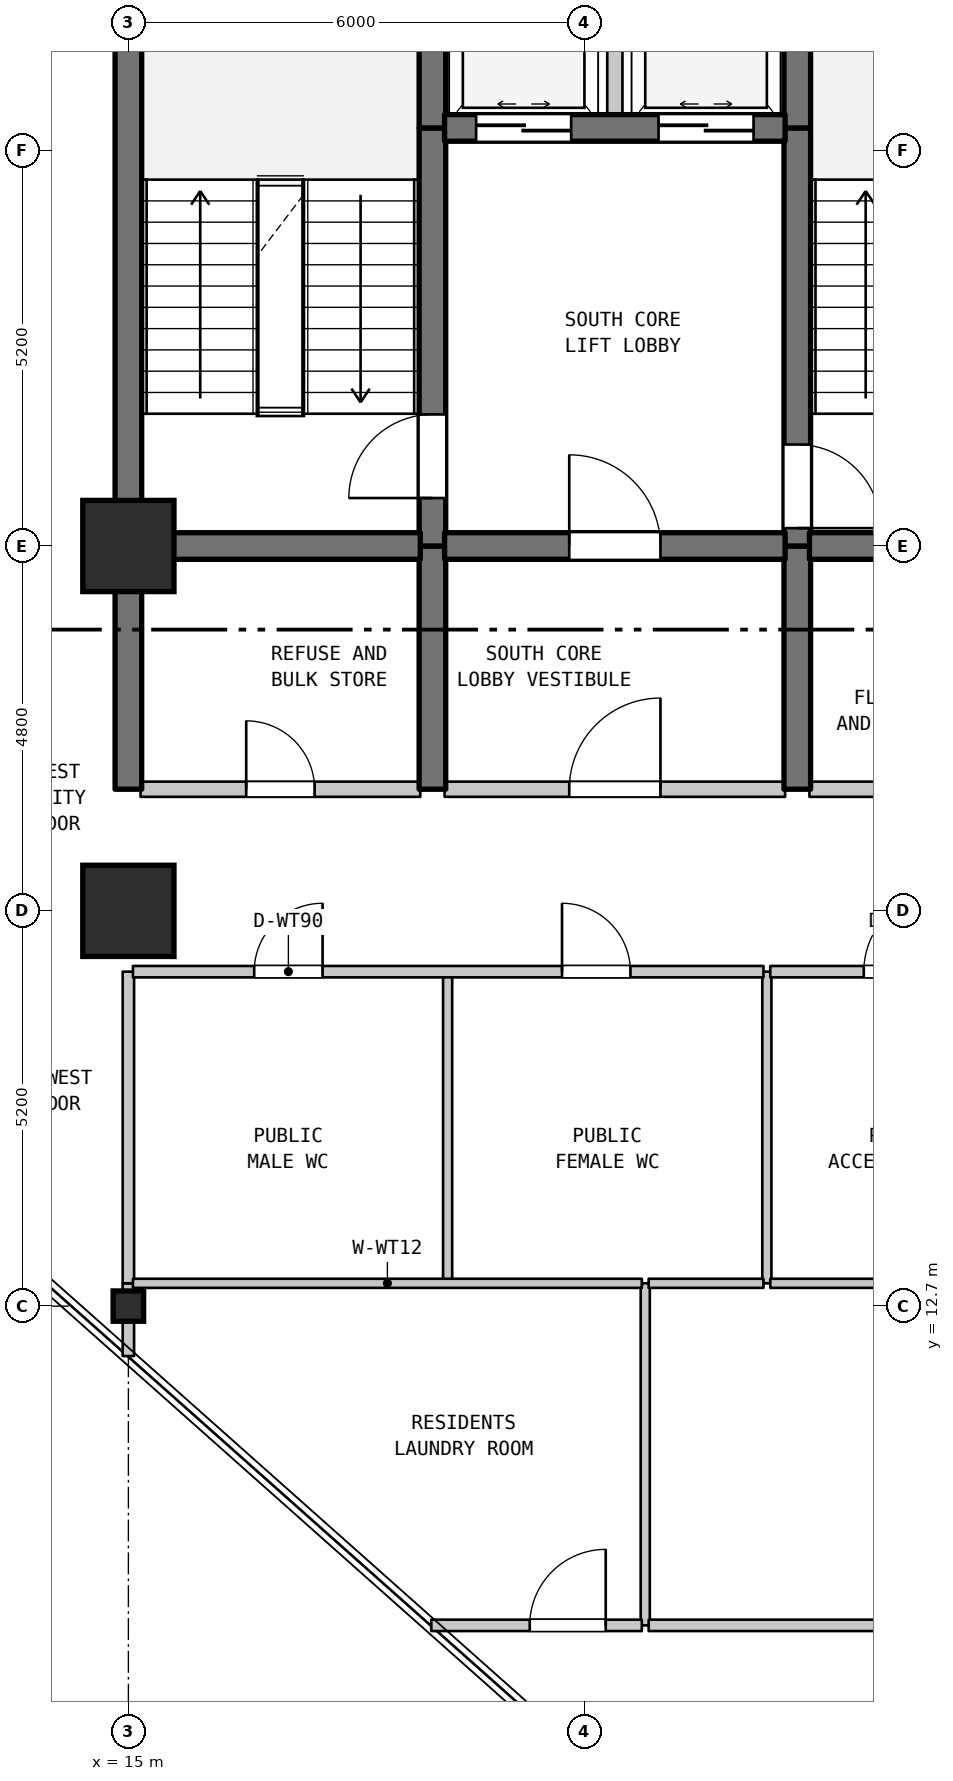
"""IFC4 building model, lengths in metres.
Left out: names, types, materials, properties, quantities, classifications, styles, units other than length and angle.
Written with IfcOpenShell. Run it as: python <this file> out.ifc"""

import sys

from ifc_helpers import new_model, si_unit, direction, frame, frame_2d, origin, origin_2d, place, context, subcontext, project, spatial, rectangle, i_section, extrude, element, fill, save


model = new_model("IFC4")
c1 = context("Model", 3, precision=1e-05, world=origin(), true_north=direction((0.0, 1.0)))
c2 = subcontext(c1, "Body", "Model", "MODEL_VIEW")
j1 = project(units=[si_unit("LENGTHUNIT", "METRE"), si_unit("PLANEANGLEUNIT", "RADIAN")], contexts=[c1])
p1 = place(None, origin())
s1 = spatial("IfcSite", under=j1, at=p1, CompositionType="ELEMENT")
p2 = place(p1, origin())
s2 = spatial("IfcBuilding", under=s1, at=p2, CompositionType="ELEMENT")
p3 = place(p2, frame((0.0, 0.0, 65.6)))
s3 = spatial("IfcBuildingStorey", under=s2, at=p3, CompositionType="ELEMENT", Elevation=65.6)
p4 = place(p3, frame((15.0, 12.7, 0.0), z_axis=(0.0, 0.0, 1.0), x_axis=(1.0, 0.0, 0.0)))
e1 = element("IfcColumn", 1, at=p4, inside=s3, PredefinedType="COLUMN", context=c2, shape_type="SweptSolid", body=[
    extrude(i_section(OverallWidth=0.401, OverallDepth=0.399, WebThickness=0.025, FlangeThickness=0.04, FilletRadius=0.015, at=origin_2d()), origin(), (0.0, 0.0, 1.0), 4.5),
])
for number, where, z_axis, x_axis in (
    (2, (15.0, 17.9, 0.0), (0.0, 0.0, 1.0), (1.0, 0.0, 0.0)),
    (3, (15.0, 22.7, 0.0), (0.0, 0.0, 1.0), (1.0, 0.0, 0.0)),
):
    element("IfcColumn", number, at=place(p3, frame(where, z_axis=z_axis, x_axis=x_axis)), inside=s3, PredefinedType="COLUMN", context=c2, shape_type="SweptSolid", body=[
        extrude(rectangle(XDim=1.2, YDim=1.2, at=origin_2d()), origin(), (0.0, 0.0, 1.0), 4.5),
    ])
p5 = place(p3, frame((15.0, 12.043, 0.0), z_axis=(0.0, 0.0, 1.0), x_axis=(0.0, 1.0, 0.0)))
e4 = element("IfcWall", 4, at=p5, inside=s3, PredefinedType="STANDARD", context=c2, shape_type="SweptSolid", body=[
    extrude(rectangle(XDim=0.957, YDim=0.15, at=frame_2d((0.479, 0.0))), origin(), (0.0, 0.0, 1.0), 4.185),
])
p6 = place(p3, frame((15.0, 13.0, 0.0), z_axis=(0.0, 0.0, 1.0), x_axis=(0.0, 1.0, 0.0)))
e5 = element("IfcWall", 5, at=p6, inside=s3, PredefinedType="STANDARD", context=c2, shape_type="SweptSolid", body=[
    extrude(rectangle(XDim=4.1, YDim=0.15, at=frame_2d((2.05, 0.0))), origin(), (0.0, 0.0, 1.0), 3.685),
])
p7 = place(p3, frame((15.0, 19.5, 0.0), z_axis=(0.0, 0.0, 1.0), x_axis=(0.0, 1.0, 0.0)))
e6 = element("IfcWall", 6, at=p7, inside=s3, PredefinedType="SHEAR", context=c2, shape_type="SweptSolid", body=[
    extrude(rectangle(XDim=3.2, YDim=0.35, at=frame_2d((1.6, 0.0))), origin(), (0.0, 0.0, 1.0), 4.185),
])
p8 = place(p3, frame((15.0, 22.7, 0.0), z_axis=(0.0, 0.0, 1.0), x_axis=(0.0, 1.0, 0.0)))
e7 = element("IfcWall", 7, at=p8, inside=s3, PredefinedType="SHEAR", context=c2, shape_type="SweptSolid", body=[
    extrude(rectangle(XDim=6.8, YDim=0.35, at=frame_2d((3.4, 0.0))), origin(), (0.0, 0.0, 1.0), 4.185),
])
p9 = place(p3, frame((19.0, 19.5, 0.0), z_axis=(0.0, 0.0, 1.0), x_axis=(0.0, 1.0, 0.0)))
e8 = element("IfcWall", 8, at=p9, inside=s3, PredefinedType="SHEAR", context=c2, shape_type="SweptSolid", body=[
    extrude(rectangle(XDim=3.2, YDim=0.35, at=frame_2d((1.6, 0.0))), origin(), (0.0, 0.0, 1.0), 4.185),
])
p10 = place(p3, frame((19.0, 22.7, 0.0), z_axis=(0.0, 0.0, 1.0), x_axis=(0.0, 1.0, 0.0)))
e9 = element("IfcWall", 9, at=p10, inside=s3, PredefinedType="SHEAR", context=c2, shape_type="SweptSolid", body=[
    extrude(rectangle(XDim=5.5, YDim=0.35, at=frame_2d((2.75, 0.0))), origin(), (0.0, 0.0, 1.0), 4.185),
])
p11 = place(p10, frame((0.631, 0.0, 0.0)))
e10 = element("IfcOpeningElement", 10, at=p11, cuts=e9, PredefinedType="OPENING", context=c2, shape_type="SweptSolid", body=[
    extrude(rectangle(XDim=1.1, YDim=2.15, at=frame_2d((0.55, 1.075))), frame((0.0, 0.185, 0.0), z_axis=(0.0, -1.0, 0.0), x_axis=(1.0, 0.0, 0.0)), (0.0, 0.0, 1.0), 0.37),
])
p12 = place(p3, frame((19.0, 28.2, 0.0), z_axis=(0.0, 0.0, 1.0), x_axis=(0.0, 1.0, 0.0)))
e11 = element("IfcWall", 11, at=p12, inside=s3, PredefinedType="SHEAR", context=c2, shape_type="SweptSolid", body=[
    extrude(rectangle(XDim=1.3, YDim=0.35, at=frame_2d((0.65, 0.0))), origin(), (0.0, 0.0, 1.0), 4.185),
])
p13 = place(p3, frame((19.2, 13.0, 0.0), z_axis=(0.0, 0.0, 1.0), x_axis=(0.0, 1.0, 0.0)))
e12 = element("IfcWall", 12, at=p13, inside=s3, PredefinedType="PARTITIONING", context=c2, shape_type="SweptSolid", body=[
    extrude(rectangle(XDim=4.1, YDim=0.12, at=frame_2d((2.05, 0.0))), origin(), (0.0, 0.0, 1.0), 4.185),
])
p14 = place(p3, frame((21.4, 28.2, 0.0), z_axis=(0.0, 0.0, 1.0), x_axis=(0.0, 1.0, 0.0)))
e13 = element("IfcWall", 13, at=p14, inside=s3, PredefinedType="STANDARD", context=c2, shape_type="SweptSolid", body=[
    extrude(rectangle(XDim=2.6, YDim=0.2, at=frame_2d((1.3, 0.0))), origin(), (0.0, 0.0, 1.0), 4.185),
])
p15 = place(p3, frame((21.8, 8.5, 0.0), z_axis=(0.0, 0.0, 1.0), x_axis=(0.0, 1.0, 0.0)))
e14 = element("IfcWall", 14, at=p15, inside=s3, PredefinedType="PARTITIONING", context=c2, shape_type="SweptSolid", body=[
    extrude(rectangle(XDim=4.5, YDim=0.12, at=frame_2d((2.25, 0.0))), origin(), (0.0, 0.0, 1.0), 4.185),
])
p16 = place(p3, frame((23.4, 13.0, 0.0), z_axis=(0.0, 0.0, 1.0), x_axis=(0.0, 1.0, 0.0)))
e15 = element("IfcWall", 15, at=p16, inside=s3, PredefinedType="PARTITIONING", context=c2, shape_type="SweptSolid", body=[
    extrude(rectangle(XDim=4.1, YDim=0.12, at=frame_2d((2.05, 0.0))), origin(), (0.0, 0.0, 1.0), 4.185),
])
p17 = place(p3, frame((23.8, 19.5, 0.0), z_axis=(0.0, 0.0, 1.0), x_axis=(0.0, 1.0, 0.0)))
e16 = element("IfcWall", 16, at=p17, inside=s3, PredefinedType="SHEAR", context=c2, shape_type="SweptSolid", body=[
    extrude(rectangle(XDim=3.2, YDim=0.35, at=frame_2d((1.6, 0.0))), origin(), (0.0, 0.0, 1.0), 4.185),
])
p18 = place(p3, frame((23.8, 22.7, 0.0), z_axis=(0.0, 0.0, 1.0), x_axis=(0.0, 1.0, 0.0)))
e17 = element("IfcWall", 17, at=p18, inside=s3, PredefinedType="SHEAR", context=c2, shape_type="SweptSolid", body=[
    extrude(rectangle(XDim=5.5, YDim=0.35, at=frame_2d((2.75, 0.0))), origin(), (0.0, 0.0, 1.0), 4.185),
])
p19 = place(p18, frame((0.235, 0.0, 0.0)))
e18 = element("IfcOpeningElement", 18, at=p19, cuts=e17, PredefinedType="OPENING", context=c2, shape_type="SweptSolid", body=[
    extrude(rectangle(XDim=1.1, YDim=2.15, at=frame_2d((0.55, 1.075))), frame((0.0, 0.185, 0.0), z_axis=(0.0, -1.0, 0.0), x_axis=(1.0, 0.0, 0.0)), (0.0, 0.0, 1.0), 0.37),
])
p20 = place(p3, frame((23.8, 28.2, 0.0), z_axis=(0.0, 0.0, 1.0), x_axis=(0.0, 1.0, 0.0)))
e19 = element("IfcWall", 19, at=p20, inside=s3, PredefinedType="SHEAR", context=c2, shape_type="SweptSolid", body=[
    extrude(rectangle(XDim=1.3, YDim=0.35, at=frame_2d((0.65, 0.0))), origin(), (0.0, 0.0, 1.0), 4.185),
])
p21 = place(p3, frame((18.985, 8.5, 0.0), z_axis=(0.0, 0.0, 1.0), x_axis=(1.0, 0.0, 0.0)))
e20 = element("IfcWall", 20, at=p21, inside=s3, PredefinedType="STANDARD", context=c2, shape_type="SweptSolid", body=[
    extrude(rectangle(XDim=2.77, YDim=0.15, at=frame_2d((1.385, 0.0))), origin(), (0.0, 0.0, 1.0), 4.185),
])
p22 = place(p21, frame((1.295, 0.0, 0.0)))
e21 = element("IfcOpeningElement", 21, at=p22, cuts=e20, PredefinedType="OPENING", context=c2, shape_type="SweptSolid", body=[
    extrude(rectangle(XDim=1.0, YDim=2.15, at=frame_2d((0.5, 1.075))), frame((0.0, 0.085, 0.0), z_axis=(0.0, -1.0, 0.0), x_axis=(1.0, 0.0, 0.0)), (0.0, 0.0, 1.0), 0.17),
])
p23 = place(p3, frame((21.845, 8.5, 0.0), z_axis=(0.0, 0.0, 1.0), x_axis=(1.0, 0.0, 0.0)))
e22 = element("IfcWall", 22, at=p23, inside=s3, PredefinedType="STANDARD", context=c2, shape_type="SweptSolid", body=[
    extrude(rectangle(XDim=3.31, YDim=0.15, at=frame_2d((1.655, 0.0))), origin(), (0.0, 0.0, 1.0), 4.185),
])
p24 = place(p3, frame((15.06, 13.0, 0.0), z_axis=(0.0, 0.0, 1.0), x_axis=(1.0, 0.0, 0.0)))
e23 = element("IfcWall", 23, at=p24, inside=s3, PredefinedType="PARTITIONING", context=c2, shape_type="SweptSolid", body=[
    extrude(rectangle(XDim=6.695, YDim=0.12, at=frame_2d((3.347, 0.0))), origin(), (0.0, 0.0, 1.0), 4.185),
])
p25 = place(p3, frame((21.845, 13.0, 0.0), z_axis=(0.0, 0.0, 1.0), x_axis=(1.0, 0.0, 0.0)))
e24 = element("IfcWall", 24, at=p25, inside=s3, PredefinedType="PARTITIONING", context=c2, shape_type="SweptSolid", body=[
    extrude(rectangle(XDim=1.51, YDim=0.12, at=frame_2d((0.755, 0.0))), origin(), (0.0, 0.0, 1.0), 4.185),
])
p26 = place(p3, frame((23.445, 13.0, 0.0), z_axis=(0.0, 0.0, 1.0), x_axis=(1.0, 0.0, 0.0)))
e25 = element("IfcWall", 25, at=p26, inside=s3, PredefinedType="PARTITIONING", context=c2, shape_type="SweptSolid", body=[
    extrude(rectangle(XDim=1.71, YDim=0.12, at=frame_2d((0.855, 0.0))), origin(), (0.0, 0.0, 1.0), 4.185),
])
p27 = place(p3, frame((15.06, 17.1, 0.0), z_axis=(0.0, 0.0, 1.0), x_axis=(1.0, 0.0, 0.0)))
e26 = element("IfcWall", 26, at=p27, inside=s3, PredefinedType="STANDARD", context=c2, shape_type="SweptSolid", body=[
    extrude(rectangle(XDim=8.295, YDim=0.15, at=frame_2d((4.147, 0.0))), origin(), (0.0, 0.0, 1.0), 4.185),
])
p28 = place(p27, frame((1.595, 0.0, 0.0)))
e27 = element("IfcOpeningElement", 27, at=p28, cuts=e26, PredefinedType="OPENING", context=c2, shape_type="SweptSolid", body=[
    extrude(rectangle(XDim=0.9, YDim=2.1, at=frame_2d((0.45, 1.05))), frame((0.0, 0.085, 0.0), z_axis=(0.0, -1.0, 0.0), x_axis=(1.0, 0.0, 0.0)), (0.0, 0.0, 1.0), 0.17),
])
p29 = place(p27, frame((5.645, 0.0, 0.0)))
e28 = element("IfcOpeningElement", 28, at=p29, cuts=e26, PredefinedType="OPENING", context=c2, shape_type="SweptSolid", body=[
    extrude(rectangle(XDim=0.9, YDim=2.1, at=frame_2d((0.45, 1.05))), frame((0.0, 0.085, 0.0), z_axis=(0.0, -1.0, 0.0), x_axis=(1.0, 0.0, 0.0)), (0.0, 0.0, 1.0), 0.17),
])
p30 = place(p3, frame((23.445, 17.1, 0.0), z_axis=(0.0, 0.0, 1.0), x_axis=(1.0, 0.0, 0.0)))
e29 = element("IfcWall", 29, at=p30, inside=s3, PredefinedType="STANDARD", context=c2, shape_type="SweptSolid", body=[
    extrude(rectangle(XDim=3.51, YDim=0.15, at=frame_2d((1.755, 0.0))), origin(), (0.0, 0.0, 1.0), 4.185),
])
p31 = place(p30, frame((1.23, 0.0, 0.0)))
e30 = element("IfcOpeningElement", 30, at=p31, cuts=e29, PredefinedType="OPENING", context=c2, shape_type="SweptSolid", body=[
    extrude(rectangle(XDim=1.05, YDim=2.15, at=frame_2d((0.525, 1.075))), frame((0.0, 0.085, 0.0), z_axis=(0.0, -1.0, 0.0), x_axis=(1.0, 0.0, 0.0)), (0.0, 0.0, 1.0), 0.17),
])
p32 = place(p3, frame((15.16, 19.5, 0.0), z_axis=(0.0, 0.0, 1.0), x_axis=(1.0, 0.0, 0.0)))
e31 = element("IfcWall", 31, at=p32, inside=s3, PredefinedType="STANDARD", context=c2, shape_type="SweptSolid", body=[
    extrude(rectangle(XDim=3.68, YDim=0.2, at=frame_2d((1.84, 0.0))), origin(), (0.0, 0.0, 1.0), 4.185),
])
p33 = place(p32, frame((1.39, 0.0, 0.0)))
e32 = element("IfcOpeningElement", 32, at=p33, cuts=e31, PredefinedType="OPENING", context=c2, shape_type="SweptSolid", body=[
    extrude(rectangle(XDim=0.9, YDim=2.15, at=frame_2d((0.45, 1.075))), frame((0.0, 0.11, 0.0), z_axis=(0.0, -1.0, 0.0), x_axis=(1.0, 0.0, 0.0)), (0.0, 0.0, 1.0), 0.22),
])
p34 = place(p3, frame((19.16, 19.5, 0.0), z_axis=(0.0, 0.0, 1.0), x_axis=(1.0, 0.0, 0.0)))
e33 = element("IfcWall", 33, at=p34, inside=s3, PredefinedType="STANDARD", context=c2, shape_type="SweptSolid", body=[
    extrude(rectangle(XDim=4.48, YDim=0.2, at=frame_2d((2.24, 0.0))), origin(), (0.0, 0.0, 1.0), 4.185),
])
p35 = place(p34, frame((1.64, 0.0, 0.0)))
e34 = element("IfcOpeningElement", 34, at=p35, cuts=e33, PredefinedType="OPENING", context=c2, shape_type="SweptSolid", body=[
    extrude(rectangle(XDim=1.2, YDim=2.2, at=frame_2d((0.6, 1.1))), frame((0.0, 0.11, 0.0), z_axis=(0.0, -1.0, 0.0), x_axis=(1.0, 0.0, 0.0)), (0.0, 0.0, 1.0), 0.22),
])
p36 = place(p3, frame((23.96, 19.5, 0.0), z_axis=(0.0, 0.0, 1.0), x_axis=(1.0, 0.0, 0.0)))
e35 = element("IfcWall", 35, at=p36, inside=s3, PredefinedType="STANDARD", context=c2, shape_type="SweptSolid", body=[
    extrude(rectangle(XDim=3.155, YDim=0.2, at=frame_2d((1.578, 0.0))), origin(), (0.0, 0.0, 1.0), 4.185),
])
p37 = place(p36, frame((0.991, 0.0, 0.0)))
e36 = element("IfcOpeningElement", 36, at=p37, cuts=e35, PredefinedType="OPENING", context=c2, shape_type="SweptSolid", body=[
    extrude(rectangle(XDim=0.95, YDim=2.15, at=frame_2d((0.475, 1.075))), frame((0.0, 0.11, 0.0), z_axis=(0.0, -1.0, 0.0), x_axis=(1.0, 0.0, 0.0)), (0.0, 0.0, 1.0), 0.22),
])
p38 = place(p3, frame((15.16, 22.7, 0.0), z_axis=(0.0, 0.0, 1.0), x_axis=(1.0, 0.0, 0.0)))
e37 = element("IfcWall", 37, at=p38, inside=s3, PredefinedType="SHEAR", context=c2, shape_type="SweptSolid", body=[
    extrude(rectangle(XDim=3.68, YDim=0.35, at=frame_2d((1.84, 0.0))), origin(), (0.0, 0.0, 1.0), 4.185),
])
p39 = place(p3, frame((19.16, 22.7, 0.0), z_axis=(0.0, 0.0, 1.0), x_axis=(1.0, 0.0, 0.0)))
e38 = element("IfcWall", 38, at=p39, inside=s3, PredefinedType="SHEAR", context=c2, shape_type="SweptSolid", body=[
    extrude(rectangle(XDim=4.48, YDim=0.35, at=frame_2d((2.24, 0.0))), origin(), (0.0, 0.0, 1.0), 4.185),
])
p40 = place(p39, frame((1.64, 0.0, 0.0)))
e39 = element("IfcOpeningElement", 39, at=p40, cuts=e38, PredefinedType="OPENING", context=c2, shape_type="SweptSolid", body=[
    extrude(rectangle(XDim=1.2, YDim=2.2, at=frame_2d((0.6, 1.1))), frame((0.0, 0.185, 0.0), z_axis=(0.0, -1.0, 0.0), x_axis=(1.0, 0.0, 0.0)), (0.0, 0.0, 1.0), 0.37),
])
p41 = place(p3, frame((23.96, 22.7, 0.0), z_axis=(0.0, 0.0, 1.0), x_axis=(1.0, 0.0, 0.0)))
e40 = element("IfcWall", 40, at=p41, inside=s3, PredefinedType="SHEAR", context=c2, shape_type="SweptSolid", body=[
    extrude(rectangle(XDim=3.155, YDim=0.35, at=frame_2d((1.578, 0.0))), origin(), (0.0, 0.0, 1.0), 4.185),
])
p42 = place(p3, frame((19.16, 28.2, 0.0), z_axis=(0.0, 0.0, 1.0), x_axis=(1.0, 0.0, 0.0)))
e41 = element("IfcWall", 41, at=p42, inside=s3, PredefinedType="SHEAR", context=c2, shape_type="SweptSolid", body=[
    extrude(rectangle(XDim=4.48, YDim=0.35, at=frame_2d((2.24, 0.0))), origin(), (0.0, 0.0, 1.0), 4.185),
])
p43 = place(p42, frame((0.415, 0.0, 0.0)))
e42 = element("IfcOpeningElement", 42, at=p43, cuts=e41, PredefinedType="OPENING", context=c2, shape_type="SweptSolid", body=[
    extrude(rectangle(XDim=1.25, YDim=2.2, at=frame_2d((0.625, 1.1))), frame((0.0, 0.185, 0.0), z_axis=(0.0, -1.0, 0.0), x_axis=(1.0, 0.0, 0.0)), (0.0, 0.0, 1.0), 0.37),
])
p44 = place(p42, frame((2.815, 0.0, 0.0)))
e43 = element("IfcOpeningElement", 43, at=p44, cuts=e41, PredefinedType="OPENING", context=c2, shape_type="SweptSolid", body=[
    extrude(rectangle(XDim=1.25, YDim=2.2, at=frame_2d((0.625, 1.1))), frame((0.0, 0.185, 0.0), z_axis=(0.0, -1.0, 0.0), x_axis=(1.0, 0.0, 0.0)), (0.0, 0.0, 1.0), 0.37),
])
p45 = place(p11, origin())
e44 = element("IfcDoor", 44, at=p45, inside=s3, OperationType="SINGLE_SWING_LEFT", PredefinedType="DOOR", context=c2, shape_type="SweptSolid", body=[
    extrude(rectangle(XDim=1.1, YDim=2.15, at=frame_2d((0.55, 1.075))), frame((0.0, 0.025, 0.0), z_axis=(0.0, -1.0, 0.0), x_axis=(1.0, 0.0, 0.0)), (0.0, 0.0, 1.0), 0.05),
])
fill(e10, e44)
p46 = place(p19, frame((1.1, 0.0, 0.0), z_axis=(0.0, 0.0, 1.0), x_axis=(-1.0, 0.0, 0.0)))
e45 = element("IfcDoor", 45, at=p46, inside=s3, OperationType="SINGLE_SWING_LEFT", PredefinedType="DOOR", context=c2, shape_type="SweptSolid", body=[
    extrude(rectangle(XDim=1.1, YDim=2.15, at=frame_2d((0.55, 1.075))), frame((0.0, 0.025, 0.0), z_axis=(0.0, -1.0, 0.0), x_axis=(1.0, 0.0, 0.0)), (0.0, 0.0, 1.0), 0.05),
])
fill(e18, e45)
p47 = place(p22, origin())
e46 = element("IfcDoor", 46, at=p47, inside=s3, OperationType="SINGLE_SWING_RIGHT", PredefinedType="DOOR", context=c2, shape_type="SweptSolid", body=[
    extrude(rectangle(XDim=1.0, YDim=2.15, at=frame_2d((0.5, 1.075))), frame((0.0, 0.025, 0.0), z_axis=(0.0, -1.0, 0.0), x_axis=(1.0, 0.0, 0.0)), (0.0, 0.0, 1.0), 0.05),
])
fill(e21, e46)
p48 = place(p28, origin())
e47 = element("IfcDoor", 47, at=p48, inside=s3, OperationType="SINGLE_SWING_RIGHT", PredefinedType="DOOR", context=c2, shape_type="SweptSolid", body=[
    extrude(rectangle(XDim=0.9, YDim=2.1, at=frame_2d((0.45, 1.05))), frame((0.0, 0.025, 0.0), z_axis=(0.0, -1.0, 0.0), x_axis=(1.0, 0.0, 0.0)), (0.0, 0.0, 1.0), 0.05),
])
fill(e27, e47)
p49 = place(p29, origin())
e48 = element("IfcDoor", 48, at=p49, inside=s3, OperationType="SINGLE_SWING_LEFT", PredefinedType="DOOR", context=c2, shape_type="SweptSolid", body=[
    extrude(rectangle(XDim=0.9, YDim=2.1, at=frame_2d((0.45, 1.05))), frame((0.0, 0.025, 0.0), z_axis=(0.0, -1.0, 0.0), x_axis=(1.0, 0.0, 0.0)), (0.0, 0.0, 1.0), 0.05),
])
fill(e28, e48)
p50 = place(p31, origin())
e49 = element("IfcDoor", 49, at=p50, inside=s3, OperationType="SINGLE_SWING_RIGHT", PredefinedType="DOOR", context=c2, shape_type="SweptSolid", body=[
    extrude(rectangle(XDim=1.05, YDim=2.15, at=frame_2d((0.525, 1.075))), frame((0.0, 0.025, 0.0), z_axis=(0.0, -1.0, 0.0), x_axis=(1.0, 0.0, 0.0)), (0.0, 0.0, 1.0), 0.05),
])
fill(e30, e49)
p51 = place(p33, origin())
e50 = element("IfcDoor", 50, at=p51, inside=s3, OperationType="SINGLE_SWING_LEFT", PredefinedType="DOOR", context=c2, shape_type="SweptSolid", body=[
    extrude(rectangle(XDim=0.9, YDim=2.15, at=frame_2d((0.45, 1.075))), frame((0.0, 0.025, 0.0), z_axis=(0.0, -1.0, 0.0), x_axis=(1.0, 0.0, 0.0)), (0.0, 0.0, 1.0), 0.05),
])
fill(e32, e50)
p52 = place(p35, origin())
e51 = element("IfcDoor", 51, at=p52, inside=s3, OperationType="SINGLE_SWING_RIGHT", PredefinedType="DOOR", context=c2, shape_type="SweptSolid", body=[
    extrude(rectangle(XDim=1.2, YDim=2.2, at=frame_2d((0.6, 1.1))), frame((0.0, 0.025, 0.0), z_axis=(0.0, -1.0, 0.0), x_axis=(1.0, 0.0, 0.0)), (0.0, 0.0, 1.0), 0.05),
])
fill(e34, e51)
p53 = place(p40, origin())
e52 = element("IfcDoor", 52, at=p53, inside=s3, OperationType="SINGLE_SWING_LEFT", PredefinedType="DOOR", context=c2, shape_type="SweptSolid", body=[
    extrude(rectangle(XDim=1.2, YDim=2.2, at=frame_2d((0.6, 1.1))), frame((0.0, 0.025, 0.0), z_axis=(0.0, -1.0, 0.0), x_axis=(1.0, 0.0, 0.0)), (0.0, 0.0, 1.0), 0.05),
])
fill(e39, e52)
p54 = place(p43, origin())
e53 = element("IfcDoor", 53, at=p54, inside=s3, OperationType="DOUBLE_DOOR_SLIDING", PredefinedType="DOOR", context=c2, shape_type="SweptSolid", body=[
    extrude(rectangle(XDim=1.25, YDim=2.2, at=frame_2d((0.625, 1.1))), frame((0.0, 0.025, 0.0), z_axis=(0.0, -1.0, 0.0), x_axis=(1.0, 0.0, 0.0)), (0.0, 0.0, 1.0), 0.05),
])
fill(e42, e53)
p55 = place(p44, origin())
e54 = element("IfcDoor", 54, at=p55, inside=s3, OperationType="DOUBLE_DOOR_SLIDING", PredefinedType="DOOR", context=c2, shape_type="SweptSolid", body=[
    extrude(rectangle(XDim=1.25, YDim=2.2, at=frame_2d((0.625, 1.1))), frame((0.0, 0.025, 0.0), z_axis=(0.0, -1.0, 0.0), x_axis=(1.0, 0.0, 0.0)), (0.0, 0.0, 1.0), 0.05),
])
fill(e43, e54)
save(model, sys.argv[1])
